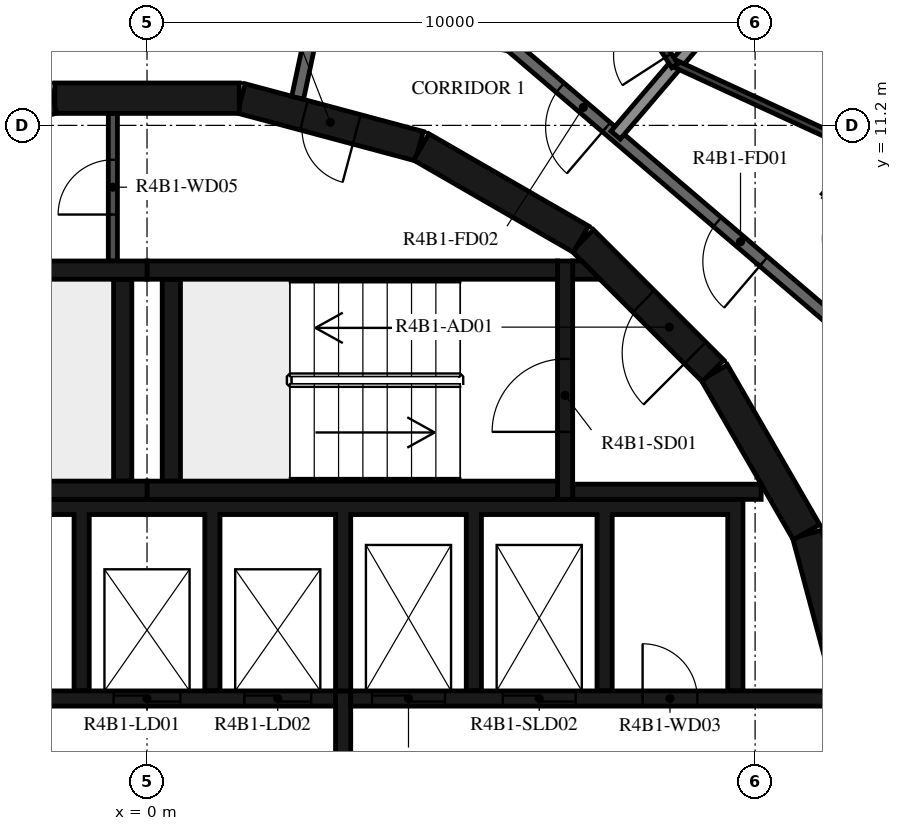
"""IFC4 building model, lengths in metres.
Left out: names, types, materials, properties, quantities, classifications, styles, units other than length and angle.
Written with IfcOpenShell. Run it as: python <this file> out.ifc"""

import sys

from ifc_helpers import new_model, si_unit, direction, frame, frame_2d, origin, place, context, subcontext, project, spatial, polyline, rectangle, outline, extrude, element, fill, save


model = new_model("IFC4")
c1 = context("Model", 3, precision=1e-05, world=origin(), true_north=direction((0.0, 1.0)))
c2 = subcontext(c1, "Body", "Model", "MODEL_VIEW")
j1 = project(units=[si_unit("LENGTHUNIT", "METRE"), si_unit("PLANEANGLEUNIT", "RADIAN")], contexts=[c1])
p1 = place(None, origin())
s1 = spatial("IfcSite", under=j1, at=p1, CompositionType="ELEMENT")
p2 = place(p1, origin())
s2 = spatial("IfcBuilding", under=s1, at=p2, CompositionType="ELEMENT")
p3 = place(p2, frame((0.0, 0.0, 162.2)))
s3 = spatial("IfcBuildingStorey", under=s2, at=p3, CompositionType="ELEMENT", Elevation=162.2)
for number, where, z_axis, x_axis in (
    (1, (11.643, 1.55, 0.0), (0.0, 0.0, 1.0), (-0.259, 0.966, 0.0)),
    (2, (10.845, 4.51, 0.0), (0.0, 0.0, 1.0), (-0.5, 0.866, 0.0)),
):
    element("IfcWall", number, at=place(p3, frame(where, z_axis=z_axis, x_axis=x_axis)), inside=s3, PredefinedType="SHEAR", context=c2, shape_type="SweptSolid", body=[
        extrude(rectangle(XDim=3.033, YDim=0.5, at=frame_2d((1.516, 0.0))), origin(), (0.0, 0.0, 1.0), 3.12),
    ])
p4 = place(p3, frame((9.308, 7.164, 0.0), z_axis=(0.0, 0.0, 1.0), x_axis=(-0.707106781187, 0.707106781187, 0.0)))
e3 = element("IfcWall", 3, at=p4, inside=s3, PredefinedType="SHEAR", context=c2, shape_type="SweptSolid", body=[
    extrude(rectangle(XDim=3.032, YDim=0.5, at=frame_2d((1.516, 0.0))), origin(), (0.0, 0.0, 1.0), 3.12),
])
p5 = place(p4, frame((0.416, 0.0, 0.0)))
e4 = element("IfcOpeningElement", 4, at=p5, cuts=e3, PredefinedType="OPENING", context=c2, shape_type="SweptSolid", body=[
    extrude(rectangle(XDim=1.2, YDim=2.1, at=frame_2d((0.6, 1.05))), frame((0.0, 0.26, 0.0), z_axis=(0.0, -1.0, 0.0), x_axis=(1.0, 0.0, 0.0)), (0.0, 0.0, 1.0), 0.52),
])
p6 = place(p3, frame((7.137, 9.329, 0.0), z_axis=(0.0, 0.0, 1.0), x_axis=(-0.865975092491, 0.500087131594, 0.0)))
e5 = element("IfcWall", 5, at=p6, inside=s3, PredefinedType="SHEAR", context=c2, shape_type="SweptSolid", body=[
    extrude(rectangle(XDim=3.033, YDim=0.5, at=frame_2d((1.516, 0.0))), origin(), (0.0, 0.0, 1.0), 3.12),
])
p7 = place(p3, frame((4.479, 10.858, 0.0), z_axis=(0.0, 0.0, 1.0), x_axis=(-0.965948410781, 0.258734743916, 0.0)))
e6 = element("IfcWall", 6, at=p7, inside=s3, PredefinedType="SHEAR", context=c2, shape_type="SweptSolid", body=[
    extrude(rectangle(XDim=3.033, YDim=0.5, at=frame_2d((1.516, 0.0))), origin(), (0.0, 0.0, 1.0), 3.12),
])
p8 = place(p7, frame((1.066, 0.0, 0.0)))
e7 = element("IfcOpeningElement", 7, at=p8, cuts=e6, PredefinedType="OPENING", context=c2, shape_type="SweptSolid", body=[
    extrude(rectangle(XDim=0.9, YDim=2.1, at=frame_2d((0.45, 1.05))), frame((0.0, 0.26, 0.0), z_axis=(0.0, -1.0, 0.0), x_axis=(1.0, 0.0, 0.0)), (0.0, 0.0, 1.0), 0.52),
])
for number, where, z_axis, x_axis in (
    (8, (1.516, 11.647, 0.0), (0.0, 0.0, 1.0), (-1.0, 0.0, 0.0)),
    (9, (-1.55, 11.643, 0.0), (0.0, 0.0, 1.0), (-0.966, -0.259, 0.0)),
):
    element("IfcWall", number, at=place(p3, frame(where, z_axis=z_axis, x_axis=x_axis)), inside=s3, PredefinedType="SHEAR", context=c2, shape_type="SweptSolid", body=[
        extrude(rectangle(XDim=3.033, YDim=0.5, at=frame_2d((1.516, 0.0))), origin(), (0.0, 0.0, 1.0), 3.12),
    ])
for number, where, z_axis, x_axis in (
    (10, (0.0, 5.2, 0.0), (0.0, 0.0, 1.0), (1.0, 0.0, 0.0)),
    (11, (0.0, 8.82, 0.0), (0.0, 0.0, 1.0), (1.0, 0.0, 0.0)),
):
    element("IfcWall", number, at=place(p3, frame(where, z_axis=z_axis, x_axis=x_axis)), inside=s3, PredefinedType="SHEAR", context=c2, shape_type="SweptSolid", body=[
        extrude(rectangle(XDim=6.75, YDim=0.3, at=frame_2d((3.375, 0.0))), origin(), (0.0, 0.0, 1.0), 3.12),
    ])
p9 = place(p3, frame((0.4, 5.35, 0.0), z_axis=(0.0, 0.0, 1.0), x_axis=(0.0, 1.0, 0.0)))
e12 = element("IfcWall", 12, at=p9, inside=s3, PredefinedType="SHEAR", context=c2, shape_type="SweptSolid", body=[
    extrude(rectangle(XDim=3.32, YDim=0.3, at=frame_2d((1.66, 0.0))), origin(), (0.0, 0.0, 1.0), 3.12),
])
p10 = place(p3, frame((6.875, 5.05, 0.0), z_axis=(0.0, 0.0, 1.0), x_axis=(0.0, 1.0, 0.0)))
e13 = element("IfcWall", 13, at=p10, inside=s3, PredefinedType="SHEAR", context=c2, shape_type="SweptSolid", body=[
    extrude(rectangle(XDim=3.92, YDim=0.25, at=frame_2d((1.96, 0.0))), origin(), (0.0, 0.0, 1.0), 3.12),
])
p11 = place(p10, frame((1.11, 0.0, 0.0)))
e14 = element("IfcOpeningElement", 14, at=p11, cuts=e13, PredefinedType="OPENING", context=c2, shape_type="SweptSolid", body=[
    extrude(rectangle(XDim=1.2, YDim=2.1, at=frame_2d((0.6, 1.05))), frame((0.0, 0.135, 0.0), z_axis=(0.0, -1.0, 0.0), x_axis=(1.0, 0.0, 0.0)), (0.0, 0.0, 1.0), 0.27),
])
p12 = place(p3, frame((7.0, 5.175, 0.0), z_axis=(0.0, 0.0, 1.0), x_axis=(1.0, 0.0, 0.0)))
e15 = element("IfcWall", 15, at=p12, inside=s3, PredefinedType="SHEAR", context=c2, shape_type="SweptSolid", body=[
    extrude(rectangle(XDim=3.1, YDim=0.25, at=frame_2d((1.55, 0.0))), origin(), (0.0, 0.0, 1.0), 3.12),
])
p13 = place(p3, origin())
e16 = element("IfcWall", 16, at=p13, inside=s3, PredefinedType="SHEAR", context=c2, shape_type="SweptSolid", body=[
    extrude(outline(polyline([(7.448, 8.67), (7.0, 8.67), (7.0, 8.97), (7.148, 8.97), (7.448, 8.67)])), origin(), (0.0, 0.0, 1.0), 3.12),
])
for number, where, z_axis, x_axis in (
    (17, (-6.75, 5.2, 0.0), (0.0, 0.0, 1.0), (1.0, 0.0, 0.0)),
    (18, (-6.75, 8.82, 0.0), (0.0, 0.0, 1.0), (1.0, 0.0, 0.0)),
):
    element("IfcWall", number, at=place(p3, frame(where, z_axis=z_axis, x_axis=x_axis)), inside=s3, PredefinedType="SHEAR", context=c2, shape_type="SweptSolid", body=[
        extrude(rectangle(XDim=6.75, YDim=0.3, at=frame_2d((3.375, 0.0))), origin(), (0.0, 0.0, 1.0), 3.12),
    ])
p14 = place(p3, frame((-0.4, 5.35, 0.0), z_axis=(0.0, 0.0, 1.0), x_axis=(0.0, 1.0, 0.0)))
e19 = element("IfcWall", 19, at=p14, inside=s3, PredefinedType="SHEAR", context=c2, shape_type="SweptSolid", body=[
    extrude(rectangle(XDim=3.32, YDim=0.3, at=frame_2d((1.66, 0.0))), origin(), (0.0, 0.0, 1.0), 3.12),
])
p15 = place(p3, origin())
e20 = element("IfcWall", 20, at=p15, inside=s3, PredefinedType="SHEAR", context=c2, shape_type="SweptSolid", body=[
    extrude(outline(polyline([(-9.55, 4.8), (-5.5, 4.8), (-5.5, 1.9), (-5.25, 1.9), (-5.25, 4.8), (-1.2, 4.8), (-1.2, 1.9), (-0.95, 1.9), (-0.95, 4.8), (0.95, 4.8), (0.95, 1.9), (1.2, 1.9), (1.2, 4.8), (3.1, 4.8), (3.1, 1.9), (3.35, 1.9), (3.35, 4.8), (5.25, 4.8), (5.25, 1.9), (5.5, 1.9), (5.5, 4.8), (7.4, 4.8), (7.4, 1.9), (7.65, 1.9), (7.65, 4.8), (9.55, 4.8), (9.55, 1.9), (9.8, 1.9), (9.8, 4.8), (9.8, 5.05), (-9.8, 5.05), (-9.8, 4.8), (-9.8, 1.9), (-9.55, 1.9), (-9.55, 4.8)])), origin(), (0.0, 0.0, 1.0), 3.12),
])
p16 = place(p3, frame((-11.28, 1.775, 0.0), z_axis=(0.0, 0.0, 1.0), x_axis=(1.0, 0.0, 0.0)))
e21 = element("IfcWall", 21, at=p16, inside=s3, PredefinedType="SHEAR", context=c2, shape_type="SweptSolid", body=[
    extrude(rectangle(XDim=14.38, YDim=0.25, at=frame_2d((7.19, 0.0))), origin(), (0.0, 0.0, 1.0), 3.12),
])
p17 = place(p16, frame((10.73, 0.0, 0.0)))
e22 = element("IfcOpeningElement", 22, at=p17, cuts=e21, PredefinedType="OPENING", context=c2, shape_type="SweptSolid", body=[
    extrude(rectangle(XDim=1.1, YDim=2.1, at=frame_2d((0.55, 1.05))), frame((0.0, 0.135, 0.0), z_axis=(0.0, -1.0, 0.0), x_axis=(1.0, 0.0, 0.0)), (0.0, 0.0, 1.0), 0.27),
])
p18 = place(p16, frame((12.88, 0.0, 0.0)))
e23 = element("IfcOpeningElement", 23, at=p18, cuts=e21, PredefinedType="OPENING", context=c2, shape_type="SweptSolid", body=[
    extrude(rectangle(XDim=1.1, YDim=2.1, at=frame_2d((0.55, 1.05))), frame((0.0, 0.135, 0.0), z_axis=(0.0, -1.0, 0.0), x_axis=(1.0, 0.0, 0.0)), (0.0, 0.0, 1.0), 0.27),
])
p19 = place(p16, frame((3.305, 0.0, 0.0)))
e24 = element("IfcOpeningElement", 24, at=p19, cuts=e21, PredefinedType="OPENING", context=c2, shape_type="SweptSolid", body=[
    extrude(rectangle(XDim=0.9, YDim=2.1, at=frame_2d((0.45, 1.05))), frame((0.0, 0.135, 0.0), z_axis=(0.0, -1.0, 0.0), x_axis=(1.0, 0.0, 0.0)), (0.0, 0.0, 1.0), 0.27),
])
p20 = place(p16, frame((7.605, 0.0, 0.0)))
e25 = element("IfcOpeningElement", 25, at=p20, cuts=e21, PredefinedType="OPENING", context=c2, shape_type="SweptSolid", body=[
    extrude(rectangle(XDim=0.9, YDim=2.1, at=frame_2d((0.45, 1.05))), frame((0.0, 0.135, 0.0), z_axis=(0.0, -1.0, 0.0), x_axis=(1.0, 0.0, 0.0)), (0.0, 0.0, 1.0), 0.27),
])
p21 = place(p3, frame((3.35, 1.775, 0.0), z_axis=(0.0, 0.0, 1.0), x_axis=(1.0, 0.0, 0.0)))
e26 = element("IfcWall", 26, at=p21, inside=s3, PredefinedType="SHEAR", context=c2, shape_type="SweptSolid", body=[
    extrude(rectangle(XDim=7.93, YDim=0.25, at=frame_2d((3.965, 0.0))), origin(), (0.0, 0.0, 1.0), 3.12),
])
p22 = place(p21, frame((0.35, 0.0, 0.0)))
e27 = element("IfcOpeningElement", 27, at=p22, cuts=e26, PredefinedType="OPENING", context=c2, shape_type="SweptSolid", body=[
    extrude(rectangle(XDim=1.2, YDim=2.4, at=frame_2d((0.6, 1.2))), frame((0.0, 0.135, 0.0), z_axis=(0.0, -1.0, 0.0), x_axis=(1.0, 0.0, 0.0)), (0.0, 0.0, 1.0), 0.27),
])
p23 = place(p21, frame((2.5, 0.0, 0.0)))
e28 = element("IfcOpeningElement", 28, at=p23, cuts=e26, PredefinedType="OPENING", context=c2, shape_type="SweptSolid", body=[
    extrude(rectangle(XDim=1.2, YDim=2.4, at=frame_2d((0.6, 1.2))), frame((0.0, 0.135, 0.0), z_axis=(0.0, -1.0, 0.0), x_axis=(1.0, 0.0, 0.0)), (0.0, 0.0, 1.0), 0.27),
])
p24 = place(p21, frame((4.8, 0.0, 0.0)))
e29 = element("IfcOpeningElement", 29, at=p24, cuts=e26, PredefinedType="OPENING", context=c2, shape_type="SweptSolid", body=[
    extrude(rectangle(XDim=0.9, YDim=2.1, at=frame_2d((0.45, 1.05))), frame((0.0, 0.135, 0.0), z_axis=(0.0, -1.0, 0.0), x_axis=(1.0, 0.0, 0.0)), (0.0, 0.0, 1.0), 0.27),
])
p25 = place(p3, frame((3.225, -1.9, 0.0), z_axis=(0.0, 0.0, 1.0), x_axis=(0.0, 1.0, 0.0)))
e30 = element("IfcWall", 30, at=p25, inside=s3, PredefinedType="SHEAR", context=c2, shape_type="SweptSolid", body=[
    extrude(rectangle(XDim=3.8, YDim=0.25, at=frame_2d((1.9, 0.0))), origin(), (0.0, 0.0, 1.0), 3.12),
])
p26 = place(p3, frame((-0.562, 8.97, 0.0), z_axis=(0.0, 0.0, 1.0), x_axis=(0.0, 1.0, 0.0)))
e31 = element("IfcWall", 31, at=p26, inside=s3, PredefinedType="PARTITIONING", context=c2, shape_type="SweptSolid", body=[
    extrude(rectangle(XDim=2.427, YDim=0.15, at=frame_2d((1.214, 0.0))), origin(), (0.0, 0.0, 1.0), 3.12),
])
p27 = place(p26, frame((0.764, 0.0, 0.0)))
e32 = element("IfcOpeningElement", 32, at=p27, cuts=e31, PredefinedType="OPENING", context=c2, shape_type="SweptSolid", body=[
    extrude(rectangle(XDim=0.9, YDim=2.1, at=frame_2d((0.45, 1.05))), frame((0.0, 0.085, 0.0), z_axis=(0.0, -1.0, 0.0), x_axis=(1.0, 0.0, 0.0)), (0.0, 0.0, 1.0), 0.17),
])
p28 = place(p3, frame((11.433, 7.858, 0.0), z_axis=(0.0, 0.0, 1.0), x_axis=(-0.760412154545, 0.649440801937, 0.0)))
e33 = element("IfcWall", 33, at=p28, inside=s3, PredefinedType="STANDARD", context=c2, shape_type="SweptSolid", body=[
    extrude(rectangle(XDim=7.181, YDim=0.2, at=frame_2d((3.59, 0.0))), origin(), (0.0, 0.0, 1.0), 3.12),
])
p29 = place(p28, frame((1.7, 0.0, 0.0)))
e34 = element("IfcOpeningElement", 34, at=p29, cuts=e33, PredefinedType="OPENING", context=c2, shape_type="SweptSolid", body=[
    extrude(rectangle(XDim=1.0, YDim=2.1, at=frame_2d((0.5, 1.05))), frame((0.0, 0.11, 0.0), z_axis=(0.0, -1.0, 0.0), x_axis=(1.0, 0.0, 0.0)), (0.0, 0.0, 1.0), 0.22),
])
p30 = place(p28, frame((5.101, 0.0, 0.0)))
e35 = element("IfcOpeningElement", 35, at=p30, cuts=e33, PredefinedType="OPENING", context=c2, shape_type="SweptSolid", body=[
    extrude(rectangle(XDim=1.0, YDim=2.1, at=frame_2d((0.5, 1.05))), frame((0.0, 0.11, 0.0), z_axis=(0.0, -1.0, 0.0), x_axis=(1.0, 0.0, 0.0)), (0.0, 0.0, 1.0), 0.22),
])
p31 = place(p3, frame((2.787, 13.112, 0.0), z_axis=(0.0, 0.0, 1.0), x_axis=(-0.207941001029, -0.978141370197, 0.0)))
e36 = element("IfcWall", 36, at=p31, inside=s3, PredefinedType="STANDARD", context=c2, shape_type="SweptSolid", body=[
    extrude(rectangle(XDim=1.491, YDim=0.2, at=frame_2d((0.746, 0.0))), origin(), (0.0, 0.0, 1.0), 3.12),
])
p32 = place(p3, frame((11.04, 14.943, 0.0), z_axis=(0.0, 0.0, 1.0), x_axis=(-0.649442880087, -0.760410379666, 0.0)))
e37 = element("IfcWall", 37, at=p32, inside=s3, PredefinedType="STANDARD", context=c2, shape_type="SweptSolid", body=[
    extrude(rectangle(XDim=5.133, YDim=0.2, at=frame_2d((2.566, 0.0))), origin(), (0.0, 0.0, 1.0), 2.73),
])
p33 = place(p3, frame((11.79, 10.781, 0.0), z_axis=(0.0, 0.0, 1.0), x_axis=(-0.907999296286, 0.418971691101, 0.0)))
e38 = element("IfcWall", 38, at=p33, inside=s3, PredefinedType="PARTITIONING", context=c2, shape_type="SweptSolid", body=[
    extrude(rectangle(XDim=3.401, YDim=0.12, at=frame_2d((1.701, 0.0))), origin(), (0.0, 0.0, 1.0), 3.12),
])
p34 = place(p3, frame((8.681, 12.181, 0.0), z_axis=(0.0, 0.0, 1.0), x_axis=(-0.543187118914, 0.839611668479, 0.0)))
e39 = element("IfcWall", 39, at=p34, inside=s3, PredefinedType="PARTITIONING", context=c2, shape_type="SweptSolid", body=[
    extrude(rectangle(XDim=3.313, YDim=0.12, at=frame_2d((1.657, 0.0))), origin(), (0.0, 0.0, 1.0), 3.12),
])
p35 = place(p34, frame((0.2, 0.0, 0.0)))
e40 = element("IfcOpeningElement", 40, at=p35, cuts=e39, PredefinedType="OPENING", context=c2, shape_type="SweptSolid", body=[
    extrude(rectangle(XDim=0.9, YDim=2.1, at=frame_2d((0.45, 1.05))), frame((0.0, 0.07, 0.0), z_axis=(0.0, -1.0, 0.0), x_axis=(1.0, 0.0, 0.0)), (0.0, 0.0, 1.0), 0.14),
])
p36 = place(p11, origin())
e41 = element("IfcDoor", 41, at=p36, inside=s3, OperationType="SINGLE_SWING_LEFT", PredefinedType="DOOR", context=c2, shape_type="SweptSolid", body=[
    extrude(rectangle(XDim=1.2, YDim=2.1, at=frame_2d((0.6, 1.05))), frame((0.0, 0.025, 0.0), z_axis=(0.0, -1.0, 0.0), x_axis=(1.0, 0.0, 0.0)), (0.0, 0.0, 1.0), 0.05),
])
fill(e14, e41)
p37 = place(p5, origin())
e42 = element("IfcDoor", 42, at=p37, inside=s3, OperationType="SINGLE_SWING_RIGHT", PredefinedType="DOOR", context=c2, shape_type="SweptSolid", body=[
    extrude(rectangle(XDim=1.2, YDim=2.1, at=frame_2d((0.6, 1.05))), frame((0.0, 0.025, 0.0), z_axis=(0.0, -1.0, 0.0), x_axis=(1.0, 0.0, 0.0)), (0.0, 0.0, 1.0), 0.05),
])
fill(e4, e42)
p38 = place(p17, origin())
e43 = element("IfcDoor", 43, at=p38, inside=s3, OperationType="DOUBLE_DOOR_SLIDING", PredefinedType="DOOR", context=c2, shape_type="SweptSolid", body=[
    extrude(rectangle(XDim=1.1, YDim=2.1, at=frame_2d((0.55, 1.05))), frame((0.0, 0.025, 0.0), z_axis=(0.0, -1.0, 0.0), x_axis=(1.0, 0.0, 0.0)), (0.0, 0.0, 1.0), 0.05),
])
fill(e22, e43)
p39 = place(p18, origin())
e44 = element("IfcDoor", 44, at=p39, inside=s3, OperationType="DOUBLE_DOOR_SLIDING", PredefinedType="DOOR", context=c2, shape_type="SweptSolid", body=[
    extrude(rectangle(XDim=1.1, YDim=2.1, at=frame_2d((0.55, 1.05))), frame((0.0, 0.025, 0.0), z_axis=(0.0, -1.0, 0.0), x_axis=(1.0, 0.0, 0.0)), (0.0, 0.0, 1.0), 0.05),
])
fill(e23, e44)
p40 = place(p22, origin())
e45 = element("IfcDoor", 45, at=p40, inside=s3, OperationType="DOUBLE_DOOR_SLIDING", PredefinedType="DOOR", context=c2, shape_type="SweptSolid", body=[
    extrude(rectangle(XDim=1.2, YDim=2.4, at=frame_2d((0.6, 1.2))), frame((0.0, 0.025, 0.0), z_axis=(0.0, -1.0, 0.0), x_axis=(1.0, 0.0, 0.0)), (0.0, 0.0, 1.0), 0.05),
])
fill(e27, e45)
p41 = place(p23, origin())
e46 = element("IfcDoor", 46, at=p41, inside=s3, OperationType="DOUBLE_DOOR_SLIDING", PredefinedType="DOOR", context=c2, shape_type="SweptSolid", body=[
    extrude(rectangle(XDim=1.2, YDim=2.4, at=frame_2d((0.6, 1.2))), frame((0.0, 0.025, 0.0), z_axis=(0.0, -1.0, 0.0), x_axis=(1.0, 0.0, 0.0)), (0.0, 0.0, 1.0), 0.05),
])
fill(e28, e46)
p42 = place(p24, origin())
e47 = element("IfcDoor", 47, at=p42, inside=s3, OperationType="SINGLE_SWING_LEFT", PredefinedType="DOOR", context=c2, shape_type="SweptSolid", body=[
    extrude(rectangle(XDim=0.9, YDim=2.1, at=frame_2d((0.45, 1.05))), frame((0.0, 0.025, 0.0), z_axis=(0.0, -1.0, 0.0), x_axis=(1.0, 0.0, 0.0)), (0.0, 0.0, 1.0), 0.05),
])
fill(e29, e47)
p43 = place(p27, origin())
e48 = element("IfcDoor", 48, at=p43, inside=s3, OperationType="SINGLE_SWING_LEFT", PredefinedType="DOOR", context=c2, shape_type="SweptSolid", body=[
    extrude(rectangle(XDim=0.9, YDim=2.1, at=frame_2d((0.45, 1.05))), frame((0.0, 0.025, 0.0), z_axis=(0.0, -1.0, 0.0), x_axis=(1.0, 0.0, 0.0)), (0.0, 0.0, 1.0), 0.05),
])
fill(e32, e48)
p44 = place(p8, origin())
e49 = element("IfcDoor", 49, at=p44, inside=s3, OperationType="SINGLE_SWING_RIGHT", PredefinedType="DOOR", context=c2, shape_type="SweptSolid", body=[
    extrude(rectangle(XDim=0.9, YDim=2.1, at=frame_2d((0.45, 1.05))), frame((0.0, 0.025, 0.0), z_axis=(0.0, -1.0, 0.0), x_axis=(1.0, 0.0, 0.0)), (0.0, 0.0, 1.0), 0.05),
])
fill(e7, e49)
p45 = place(p29, origin())
e50 = element("IfcDoor", 50, at=p45, inside=s3, OperationType="SINGLE_SWING_LEFT", PredefinedType="DOOR", context=c2, shape_type="SweptSolid", body=[
    extrude(rectangle(XDim=1.0, YDim=2.1, at=frame_2d((0.5, 1.05))), frame((0.0, 0.025, 0.0), z_axis=(0.0, -1.0, 0.0), x_axis=(1.0, 0.0, 0.0)), (0.0, 0.0, 1.0), 0.05),
])
fill(e34, e50)
p46 = place(p30, origin())
e51 = element("IfcDoor", 51, at=p46, inside=s3, OperationType="SINGLE_SWING_RIGHT", PredefinedType="DOOR", context=c2, shape_type="SweptSolid", body=[
    extrude(rectangle(XDim=1.0, YDim=2.1, at=frame_2d((0.5, 1.05))), frame((0.0, 0.025, 0.0), z_axis=(0.0, -1.0, 0.0), x_axis=(1.0, 0.0, 0.0)), (0.0, 0.0, 1.0), 0.05),
])
fill(e35, e51)
p47 = place(p35, origin())
e52 = element("IfcDoor", 52, at=p47, inside=s3, OperationType="SINGLE_SWING_RIGHT", PredefinedType="DOOR", context=c2, shape_type="SweptSolid", body=[
    extrude(rectangle(XDim=0.9, YDim=2.1, at=frame_2d((0.45, 1.05))), frame((0.0, 0.025, 0.0), z_axis=(0.0, -1.0, 0.0), x_axis=(1.0, 0.0, 0.0)), (0.0, 0.0, 1.0), 0.05),
])
fill(e40, e52)
save(model, sys.argv[1])
